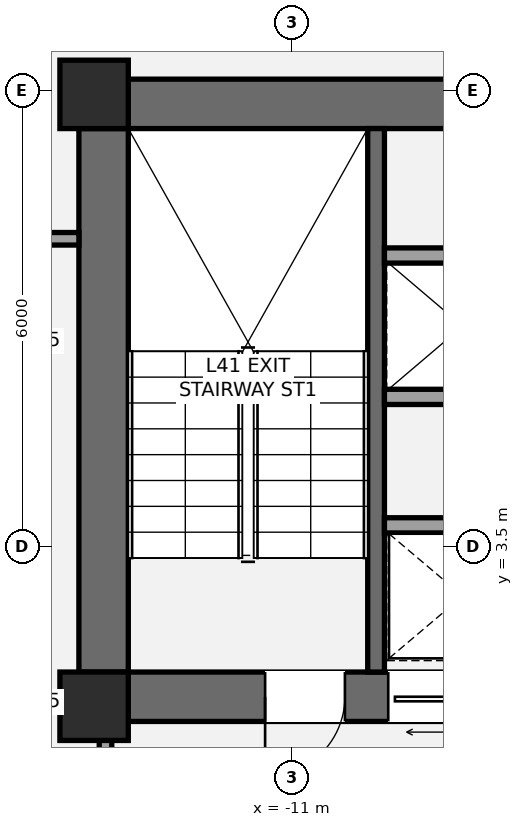
"""IFC4 building model, lengths in metres.
Left out: names, types, materials, properties, quantities, classifications, styles, units other than length and angle.
Written with IfcOpenShell. Run it as: python <this file> out.ifc"""

import sys

from ifc_helpers import new_model, si_unit, direction, frame, frame_2d, origin, origin_2d, place, context, subcontext, project, spatial, rectangle, extrude, element, fill, save


model = new_model("IFC4")
c1 = context("Model", 3, precision=1e-05, world=origin(), true_north=direction((0.0, 1.0)))
c2 = subcontext(c1, "Body", "Model", "MODEL_VIEW")
j1 = project(units=[si_unit("LENGTHUNIT", "METRE"), si_unit("PLANEANGLEUNIT", "RADIAN")], contexts=[c1])
p1 = place(None, origin())
s1 = spatial("IfcSite", under=j1, at=p1, CompositionType="ELEMENT")
p2 = place(p1, origin())
s2 = spatial("IfcBuilding", under=s1, at=p2, CompositionType="ELEMENT")
p3 = place(p2, frame((0.0, 0.0, 153.4)))
s3 = spatial("IfcBuildingStorey", under=s2, at=p3, CompositionType="ELEMENT", Elevation=153.4)
p4 = place(p3, frame((-13.475, 1.2, 0.0), z_axis=(0.0, 0.0, 1.0), x_axis=(0.0, 1.0, 0.0)))
e1 = element("IfcWall", 1, at=p4, inside=s3, PredefinedType="SHEAR", context=c2, shape_type="SweptSolid", body=[
    extrude(rectangle(XDim=8.45, YDim=0.65, at=frame_2d((4.225, 0.0))), origin(), (0.0, 0.0, 1.0), 3.2),
])
p5 = place(p3, frame((-13.8, 9.325, 0.0), z_axis=(0.0, 0.0, 1.0), x_axis=(1.0, 0.0, 0.0)))
e2 = element("IfcWall", 2, at=p5, inside=s3, PredefinedType="SHEAR", context=c2, shape_type="SweptSolid", body=[
    extrude(rectangle(XDim=9.325, YDim=0.65, at=frame_2d((4.663, 0.0))), origin(), (0.0, 0.0, 1.0), 3.2),
])
p6 = place(p3, frame((-4.875, 1.525, 0.0), z_axis=(0.0, 0.0, 1.0), x_axis=(-1.0, 0.0, 0.0)))
e3 = element("IfcWall", 3, at=p6, inside=s3, PredefinedType="SHEAR", context=c2, shape_type="SweptSolid", body=[
    extrude(rectangle(XDim=8.925, YDim=0.65, at=frame_2d((4.462, 0.0))), origin(), (0.0, 0.0, 1.0), 3.2),
])
p7 = place(p6, frame((5.425, 0.0, 0.0)))
e4 = element("IfcOpeningElement", 4, at=p7, cuts=e3, PredefinedType="OPENING", context=c2, shape_type="SweptSolid", body=[
    extrude(rectangle(XDim=1.05, YDim=2.15, at=frame_2d((0.525, 1.075))), frame((0.0, 0.335, 0.0), z_axis=(0.0, -1.0, 0.0), x_axis=(1.0, 0.0, 0.0)), (0.0, 0.0, 1.0), 0.67),
])
p8 = place(p6, frame((3.755, 0.0, 0.0)))
e5 = element("IfcOpeningElement", 5, at=p8, cuts=e3, PredefinedType="OPENING", context=c2, shape_type="SweptSolid", body=[
    extrude(rectangle(XDim=1.1, YDim=2.2, at=frame_2d((0.55, 1.1))), frame((0.0, 0.335, 0.0), z_axis=(0.0, -1.0, 0.0), x_axis=(1.0, 0.0, 0.0)), (0.0, 0.0, 1.0), 0.67),
])
p9 = place(p3, frame((-9.89, 1.85, 0.0), z_axis=(0.0, 0.0, 1.0), x_axis=(0.0, 1.0, 0.0)))
e6 = element("IfcWall", 6, at=p9, inside=s3, PredefinedType="SHEAR", context=c2, shape_type="SweptSolid", body=[
    extrude(rectangle(XDim=7.15, YDim=0.22, at=frame_2d((3.575, 0.0))), origin(), (0.0, 0.0, 1.0), 3.2),
])
for number, where, z_axis, x_axis in (
    (7, (-13.6, 1.4, 0.0), (0.0, 0.0, 1.0), (1.0, 0.0, 0.0)),
    (8, (-13.6, 9.45, 0.0), (0.0, 0.0, 1.0), (1.0, 0.0, 0.0)),
):
    element("IfcColumn", number, at=place(p3, frame(where, z_axis=z_axis, x_axis=x_axis)), inside=s3, PredefinedType="COLUMN", context=c2, shape_type="SweptSolid", body=[
        extrude(rectangle(XDim=0.9, YDim=0.9, at=origin_2d()), origin(), (0.0, 0.0, 1.0), 3.2),
    ])
p10 = place(p3, frame((-13.45, -2.15, 0.0), z_axis=(0.0, 0.0, 1.0), x_axis=(0.0, 1.0, 0.0)))
e9 = element("IfcWall", 9, at=p10, inside=s3, PredefinedType="PARTITIONING", context=c2, shape_type="SweptSolid", body=[
    extrude(rectangle(XDim=3.4, YDim=0.165, at=frame_2d((1.7, 0.0))), origin(), (0.0, 0.0, 1.0), 2.473),
])
p11 = place(p10, frame((1.15, 0.0, 0.0)))
e10 = element("IfcOpeningElement", 10, at=p11, cuts=e9, PredefinedType="OPENING", context=c2, shape_type="SweptSolid", body=[
    extrude(rectangle(XDim=1.05, YDim=2.15, at=frame_2d((0.525, 1.075))), frame((0.0, 0.093, 0.0), z_axis=(0.0, -1.0, 0.0), x_axis=(1.0, 0.0, 0.0)), (0.0, 0.0, 1.0), 0.185),
])
for number, where, z_axis, x_axis in (
    (11, (-9.78, 3.78, 0.0), (0.0, 0.0, 1.0), (1.0, 0.0, 0.0)),
    (12, (-9.78, 5.47, 0.0), (0.0, 0.0, 1.0), (1.0, 0.0, 0.0)),
    (13, (-9.78, 7.33, 0.0), (0.0, 0.0, 1.0), (1.0, 0.0, 0.0)),
):
    element("IfcWall", number, at=place(p3, frame(where, z_axis=z_axis, x_axis=x_axis)), inside=s3, PredefinedType="SOLIDWALL", context=c2, shape_type="SweptSolid", body=[
        extrude(rectangle(XDim=4.255, YDim=0.2, at=frame_2d((2.127, 0.0))), origin(), (0.0, 0.0, 1.0), 3.02),
    ])
p12 = place(p3, frame((-15.75, 7.55, 0.0), z_axis=(0.0, 0.0, 1.0), x_axis=(1.0, 0.0, 0.0)))
e14 = element("IfcWall", 14, at=p12, inside=s3, PredefinedType="PARTITIONING", context=c2, shape_type="SweptSolid", body=[
    extrude(rectangle(XDim=1.95, YDim=0.165, at=frame_2d((0.975, 0.0))), origin(), (0.0, 0.0, 1.0), 3.02),
])
p13 = place(p12, frame((0.3, 0.0, 0.0)))
e15 = element("IfcOpeningElement", 15, at=p13, cuts=e14, PredefinedType="OPENING", context=c2, shape_type="SweptSolid", body=[
    extrude(rectangle(XDim=1.0, YDim=2.15, at=frame_2d((0.5, 1.075))), frame((0.0, 0.093, 0.0), z_axis=(0.0, -1.0, 0.0), x_axis=(1.0, 0.0, 0.0)), (0.0, 0.0, 1.0), 0.185),
])
p14 = place(p7, origin())
e16 = element("IfcDoor", 16, at=p14, inside=s3, OperationType="SINGLE_SWING_RIGHT", PredefinedType="DOOR", context=c2, shape_type="SweptSolid", body=[
    extrude(rectangle(XDim=1.05, YDim=2.15, at=frame_2d((0.525, 1.075))), frame((0.0, 0.025, 0.0), z_axis=(0.0, -1.0, 0.0), x_axis=(1.0, 0.0, 0.0)), (0.0, 0.0, 1.0), 0.05),
])
fill(e4, e16)
p15 = place(p8, origin())
e17 = element("IfcDoor", 17, at=p15, inside=s3, OperationType="SLIDING_TO_LEFT", PredefinedType="DOOR", context=c2, shape_type="SweptSolid", body=[
    extrude(rectangle(XDim=1.1, YDim=2.2, at=frame_2d((0.55, 1.1))), frame((0.0, 0.025, 0.0), z_axis=(0.0, -1.0, 0.0), x_axis=(1.0, 0.0, 0.0)), (0.0, 0.0, 1.0), 0.05),
])
fill(e5, e17)
save(model, sys.argv[1])
